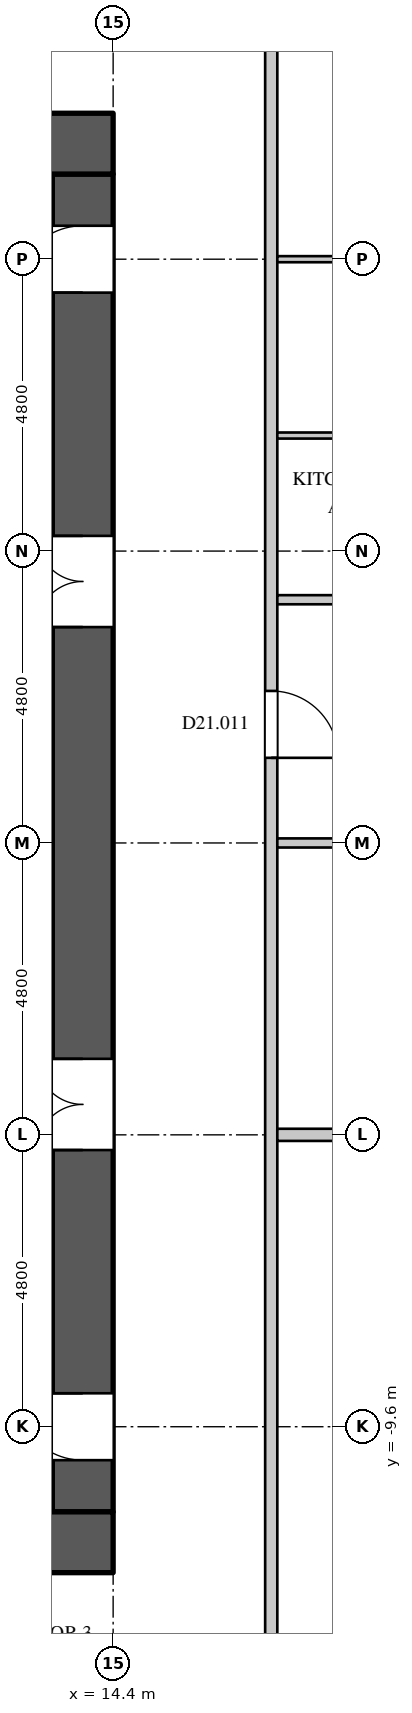
"""IFC4 building model, lengths in metres.
Left out: names, types, materials, properties, quantities, classifications, styles, units other than length and angle.
Written with IfcOpenShell. Run it as: python <this file> out.ifc"""

import sys

from ifc_helpers import new_model, si_unit, direction, frame, frame_2d, origin, place, context, subcontext, project, spatial, rectangle, extrude, element, fill, save


model = new_model("IFC4")
c1 = context("Model", 3, precision=1e-05, world=origin(), true_north=direction((0.0, 1.0)))
c2 = subcontext(c1, "Body", "Model", "MODEL_VIEW")
j1 = project(units=[si_unit("LENGTHUNIT", "METRE"), si_unit("PLANEANGLEUNIT", "RADIAN")], contexts=[c1])
p1 = place(None, origin())
s1 = spatial("IfcSite", under=j1, at=p1, CompositionType="ELEMENT")
p2 = place(p1, origin())
s2 = spatial("IfcBuilding", under=s1, at=p2, CompositionType="ELEMENT")
p3 = place(p2, frame((0.0, 0.0, 92.7)))
s3 = spatial("IfcBuildingStorey", under=s2, at=p3, CompositionType="ELEMENT", Elevation=92.7)
for number, where, z_axis, x_axis in (
    (1, (-14.4, 11.5, 0.0), (0.0, 0.0, 1.0), (1.0, 0.0, 0.0)),
    (2, (-14.4, -11.5, 0.0), (0.0, 0.0, 1.0), (1.0, 0.0, 0.0)),
):
    element("IfcWall", number, at=place(p3, frame(where, z_axis=z_axis, x_axis=x_axis)), inside=s3, PredefinedType="SHEAR", context=c2, shape_type="SweptSolid", body=[
        extrude(rectangle(XDim=28.8, YDim=1.0, at=frame_2d((14.4, 0.0))), origin(), (0.0, 0.0, 1.0), 4.2),
    ])
p4 = place(p3, frame((13.9, -11.0, 0.0), z_axis=(0.0, 0.0, 1.0), x_axis=(0.0, 1.0, 0.0)))
e3 = element("IfcWall", 3, at=p4, inside=s3, PredefinedType="SHEAR", context=c2, shape_type="SweptSolid", body=[
    extrude(rectangle(XDim=22.0, YDim=1.0, at=frame_2d((11.0, 0.0))), origin(), (0.0, 0.0, 1.0), 4.2),
])
p5 = place(p4, frame((20.05, 0.0, 0.0)))
e4 = element("IfcOpeningElement", 4, at=p5, cuts=e3, PredefinedType="OPENING", context=c2, shape_type="SweptSolid", body=[
    extrude(rectangle(XDim=1.1, YDim=2.2, at=frame_2d((0.55, 1.1))), frame((0.0, 0.51, 0.0), z_axis=(0.0, -1.0, 0.0), x_axis=(1.0, 0.0, 0.0)), (0.0, 0.0, 1.0), 1.02),
])
p6 = place(p4, frame((0.85, 0.0, 0.0)))
e5 = element("IfcOpeningElement", 5, at=p6, cuts=e3, PredefinedType="OPENING", context=c2, shape_type="SweptSolid", body=[
    extrude(rectangle(XDim=1.1, YDim=2.2, at=frame_2d((0.55, 1.1))), frame((0.0, 0.51, 0.0), z_axis=(0.0, -1.0, 0.0), x_axis=(1.0, 0.0, 0.0)), (0.0, 0.0, 1.0), 1.02),
])
p7 = place(p4, frame((14.55, 0.0, 0.0)))
e6 = element("IfcOpeningElement", 6, at=p7, cuts=e3, PredefinedType="OPENING", context=c2, shape_type="SweptSolid", body=[
    extrude(rectangle(XDim=1.5, YDim=2.4, at=frame_2d((0.75, 1.2))), frame((0.0, 0.51, 0.0), z_axis=(0.0, -1.0, 0.0), x_axis=(1.0, 0.0, 0.0)), (0.0, 0.0, 1.0), 1.02),
])
p8 = place(p4, frame((5.95, 0.0, 0.0)))
e7 = element("IfcOpeningElement", 7, at=p8, cuts=e3, PredefinedType="OPENING", context=c2, shape_type="SweptSolid", body=[
    extrude(rectangle(XDim=1.5, YDim=2.4, at=frame_2d((0.75, 1.2))), frame((0.0, 0.51, 0.0), z_axis=(0.0, -1.0, 0.0), x_axis=(1.0, 0.0, 0.0)), (0.0, 0.0, 1.0), 1.02),
])
p9 = place(p3, frame((17.0, -14.5, 0.0), z_axis=(0.0, 0.0, 1.0), x_axis=(0.0, 1.0, 0.0)))
e8 = element("IfcWall", 8, at=p9, inside=s3, PredefinedType="PARTITIONING", context=c2, shape_type="SweptSolid", body=[
    extrude(rectangle(XDim=29.0, YDim=0.2, at=frame_2d((14.5, 0.0))), origin(), (0.0, 0.0, 1.0), 3.798),
])
p10 = place(p9, frame((15.9, 0.0, 0.0)))
e9 = element("IfcOpeningElement", 9, at=p10, cuts=e8, PredefinedType="OPENING", context=c2, shape_type="SweptSolid", body=[
    extrude(rectangle(XDim=1.1, YDim=2.4, at=frame_2d((0.55, 1.2))), frame((0.0, 0.11, 0.0), z_axis=(0.0, -1.0, 0.0), x_axis=(1.0, 0.0, 0.0)), (0.0, 0.0, 1.0), 0.22),
])
p11 = place(p3, frame((17.1, 0.0, 0.0), z_axis=(0.0, 0.0, 1.0), x_axis=(1.0, 0.0, 0.0)))
e10 = element("IfcWall", 10, at=p11, inside=s3, PredefinedType="PARTITIONING", context=c2, shape_type="SweptSolid", body=[
    extrude(rectangle(XDim=11.755, YDim=0.15, at=frame_2d((5.877, 0.0))), origin(), (0.0, 0.0, 1.0), 3.798),
])
p12 = place(p11, frame((1.8, 0.0, 0.0)))
e11 = element("IfcOpeningElement", 11, at=p12, cuts=e10, PredefinedType="OPENING", context=c2, shape_type="SweptSolid", body=[
    extrude(rectangle(XDim=0.95, YDim=2.2, at=frame_2d((0.475, 1.1))), frame((0.0, 0.085, 0.0), z_axis=(0.0, -1.0, 0.0), x_axis=(1.0, 0.0, 0.0)), (0.0, 0.0, 1.0), 0.17),
])
p13 = place(p3, frame((17.1, 4.0, 0.0), z_axis=(0.0, 0.0, 1.0), x_axis=(1.0, 0.0, 0.0)))
e12 = element("IfcWall", 12, at=p13, inside=s3, PredefinedType="PARTITIONING", context=c2, shape_type="SweptSolid", body=[
    extrude(rectangle(XDim=4.625, YDim=0.15, at=frame_2d((2.312, 0.0))), origin(), (0.0, 0.0, 1.0), 3.798),
])
p14 = place(p13, frame((1.85, 0.0, 0.0)))
e13 = element("IfcOpeningElement", 13, at=p14, cuts=e12, PredefinedType="OPENING", context=c2, shape_type="SweptSolid", body=[
    extrude(rectangle(XDim=0.95, YDim=2.2, at=frame_2d((0.475, 1.1))), frame((0.0, 0.085, 0.0), z_axis=(0.0, -1.0, 0.0), x_axis=(1.0, 0.0, 0.0)), (0.0, 0.0, 1.0), 0.17),
])
p15 = place(p3, frame((17.64, 17.64, 0.0), z_axis=(0.0, 0.0, 1.0), x_axis=(0.707106781187, -0.707106781187, 0.0)))
e14 = element("IfcWall", 14, at=p15, inside=s3, PredefinedType="PARTITIONING", context=c2, shape_type="SweptSolid", body=[
    extrude(rectangle(XDim=7.938, YDim=0.15, at=frame_2d((3.969, 0.0))), origin(), (0.0, 0.0, 1.0), 3.798),
])
p16 = place(p15, frame((6.8, 0.0, 0.0)))
e15 = element("IfcOpeningElement", 15, at=p16, cuts=e14, PredefinedType="OPENING", context=c2, shape_type="SweptSolid", body=[
    extrude(rectangle(XDim=0.95, YDim=2.2, at=frame_2d((0.475, 1.1))), frame((0.0, 0.085, 0.0), z_axis=(0.0, -1.0, 0.0), x_axis=(1.0, 0.0, 0.0)), (0.0, 0.0, 1.0), 0.17),
])
p17 = place(p15, frame((2.1, 0.0, 0.0)))
e16 = element("IfcOpeningElement", 16, at=p17, cuts=e14, PredefinedType="OPENING", context=c2, shape_type="SweptSolid", body=[
    extrude(rectangle(XDim=0.95, YDim=2.2, at=frame_2d((0.475, 1.1))), frame((0.0, 0.085, 0.0), z_axis=(0.0, -1.0, 0.0), x_axis=(1.0, 0.0, 0.0)), (0.0, 0.0, 1.0), 0.17),
])
p18 = place(p3, frame((17.1, -4.8, 0.0), z_axis=(0.0, 0.0, 1.0), x_axis=(1.0, 0.0, 0.0)))
e17 = element("IfcWall", 17, at=p18, inside=s3, PredefinedType="PARTITIONING", context=c2, shape_type="SweptSolid", body=[
    extrude(rectangle(XDim=10.8, YDim=0.2, at=frame_2d((5.4, 0.0))), origin(), (0.0, 0.0, 1.0), 3.1),
])
p19 = place(p3, frame((17.1, 6.7, 0.0), z_axis=(0.0, 0.0, 1.0), x_axis=(1.0, 0.0, 0.0)))
e18 = element("IfcWall", 18, at=p19, inside=s3, PredefinedType="PARTITIONING", context=c2, shape_type="SweptSolid", body=[
    extrude(rectangle(XDim=4.625, YDim=0.1, at=frame_2d((2.312, 0.0))), origin(), (0.0, 0.0, 1.0), 3.798),
])
p20 = place(p3, frame((17.1, 9.6, 0.0), z_axis=(0.0, 0.0, 1.0), x_axis=(1.0, 0.0, 0.0)))
e19 = element("IfcWall", 19, at=p20, inside=s3, PredefinedType="PARTITIONING", context=c2, shape_type="SweptSolid", body=[
    extrude(rectangle(XDim=4.7, YDim=0.1, at=frame_2d((2.35, 0.0))), origin(), (0.0, 0.0, 1.0), 3.798),
])
p21 = place(p20, frame((1.85, 0.0, 0.0)))
e20 = element("IfcOpeningElement", 20, at=p21, cuts=e19, PredefinedType="OPENING", context=c2, shape_type="SweptSolid", body=[
    extrude(rectangle(XDim=0.9, YDim=2.2, at=frame_2d((0.45, 1.1))), frame((0.0, 0.06, 0.0), z_axis=(0.0, -1.0, 0.0), x_axis=(1.0, 0.0, 0.0)), (0.0, 0.0, 1.0), 0.12),
])
p22 = place(p5, origin())
e21 = element("IfcDoor", 21, at=p22, inside=s3, OperationType="SINGLE_SWING_LEFT", PredefinedType="DOOR", context=c2, shape_type="SweptSolid", body=[
    extrude(rectangle(XDim=1.1, YDim=2.2, at=frame_2d((0.55, 1.1))), frame((0.0, 0.495, 0.0), z_axis=(0.0, -1.0, 0.0), x_axis=(1.0, 0.0, 0.0)), (0.0, 0.0, 1.0), 0.05),
])
fill(e4, e21)
p23 = place(p6, origin())
e22 = element("IfcDoor", 22, at=p23, inside=s3, OperationType="SINGLE_SWING_RIGHT", PredefinedType="DOOR", context=c2, shape_type="SweptSolid", body=[
    extrude(rectangle(XDim=1.1, YDim=2.2, at=frame_2d((0.55, 1.1))), frame((0.0, 0.495, 0.0), z_axis=(0.0, -1.0, 0.0), x_axis=(1.0, 0.0, 0.0)), (0.0, 0.0, 1.0), 0.05),
])
fill(e5, e22)
p24 = place(p7, origin())
e23 = element("IfcDoor", 23, at=p24, inside=s3, OperationType="DOUBLE_DOOR_SINGLE_SWING", PredefinedType="DOOR", context=c2, shape_type="SweptSolid", body=[
    extrude(rectangle(XDim=1.5, YDim=2.4, at=frame_2d((0.75, 1.2))), frame((0.0, 0.495, 0.0), z_axis=(0.0, -1.0, 0.0), x_axis=(1.0, 0.0, 0.0)), (0.0, 0.0, 1.0), 0.05),
])
fill(e6, e23)
p25 = place(p8, origin())
e24 = element("IfcDoor", 24, at=p25, inside=s3, OperationType="DOUBLE_DOOR_SINGLE_SWING", PredefinedType="DOOR", context=c2, shape_type="SweptSolid", body=[
    extrude(rectangle(XDim=1.5, YDim=2.4, at=frame_2d((0.75, 1.2))), frame((0.0, 0.495, 0.0), z_axis=(0.0, -1.0, 0.0), x_axis=(1.0, 0.0, 0.0)), (0.0, 0.0, 1.0), 0.05),
])
fill(e7, e24)
p26 = place(p10, origin())
e25 = element("IfcDoor", 25, at=p26, inside=s3, OperationType="SINGLE_SWING_RIGHT", PredefinedType="DOOR", context=c2, shape_type="SweptSolid", body=[
    extrude(rectangle(XDim=1.1, YDim=2.4, at=frame_2d((0.55, 1.2))), frame((0.0, 0.025, 0.0), z_axis=(0.0, -1.0, 0.0), x_axis=(1.0, 0.0, 0.0)), (0.0, 0.0, 1.0), 0.05),
])
fill(e9, e25)
save(model, sys.argv[1])
